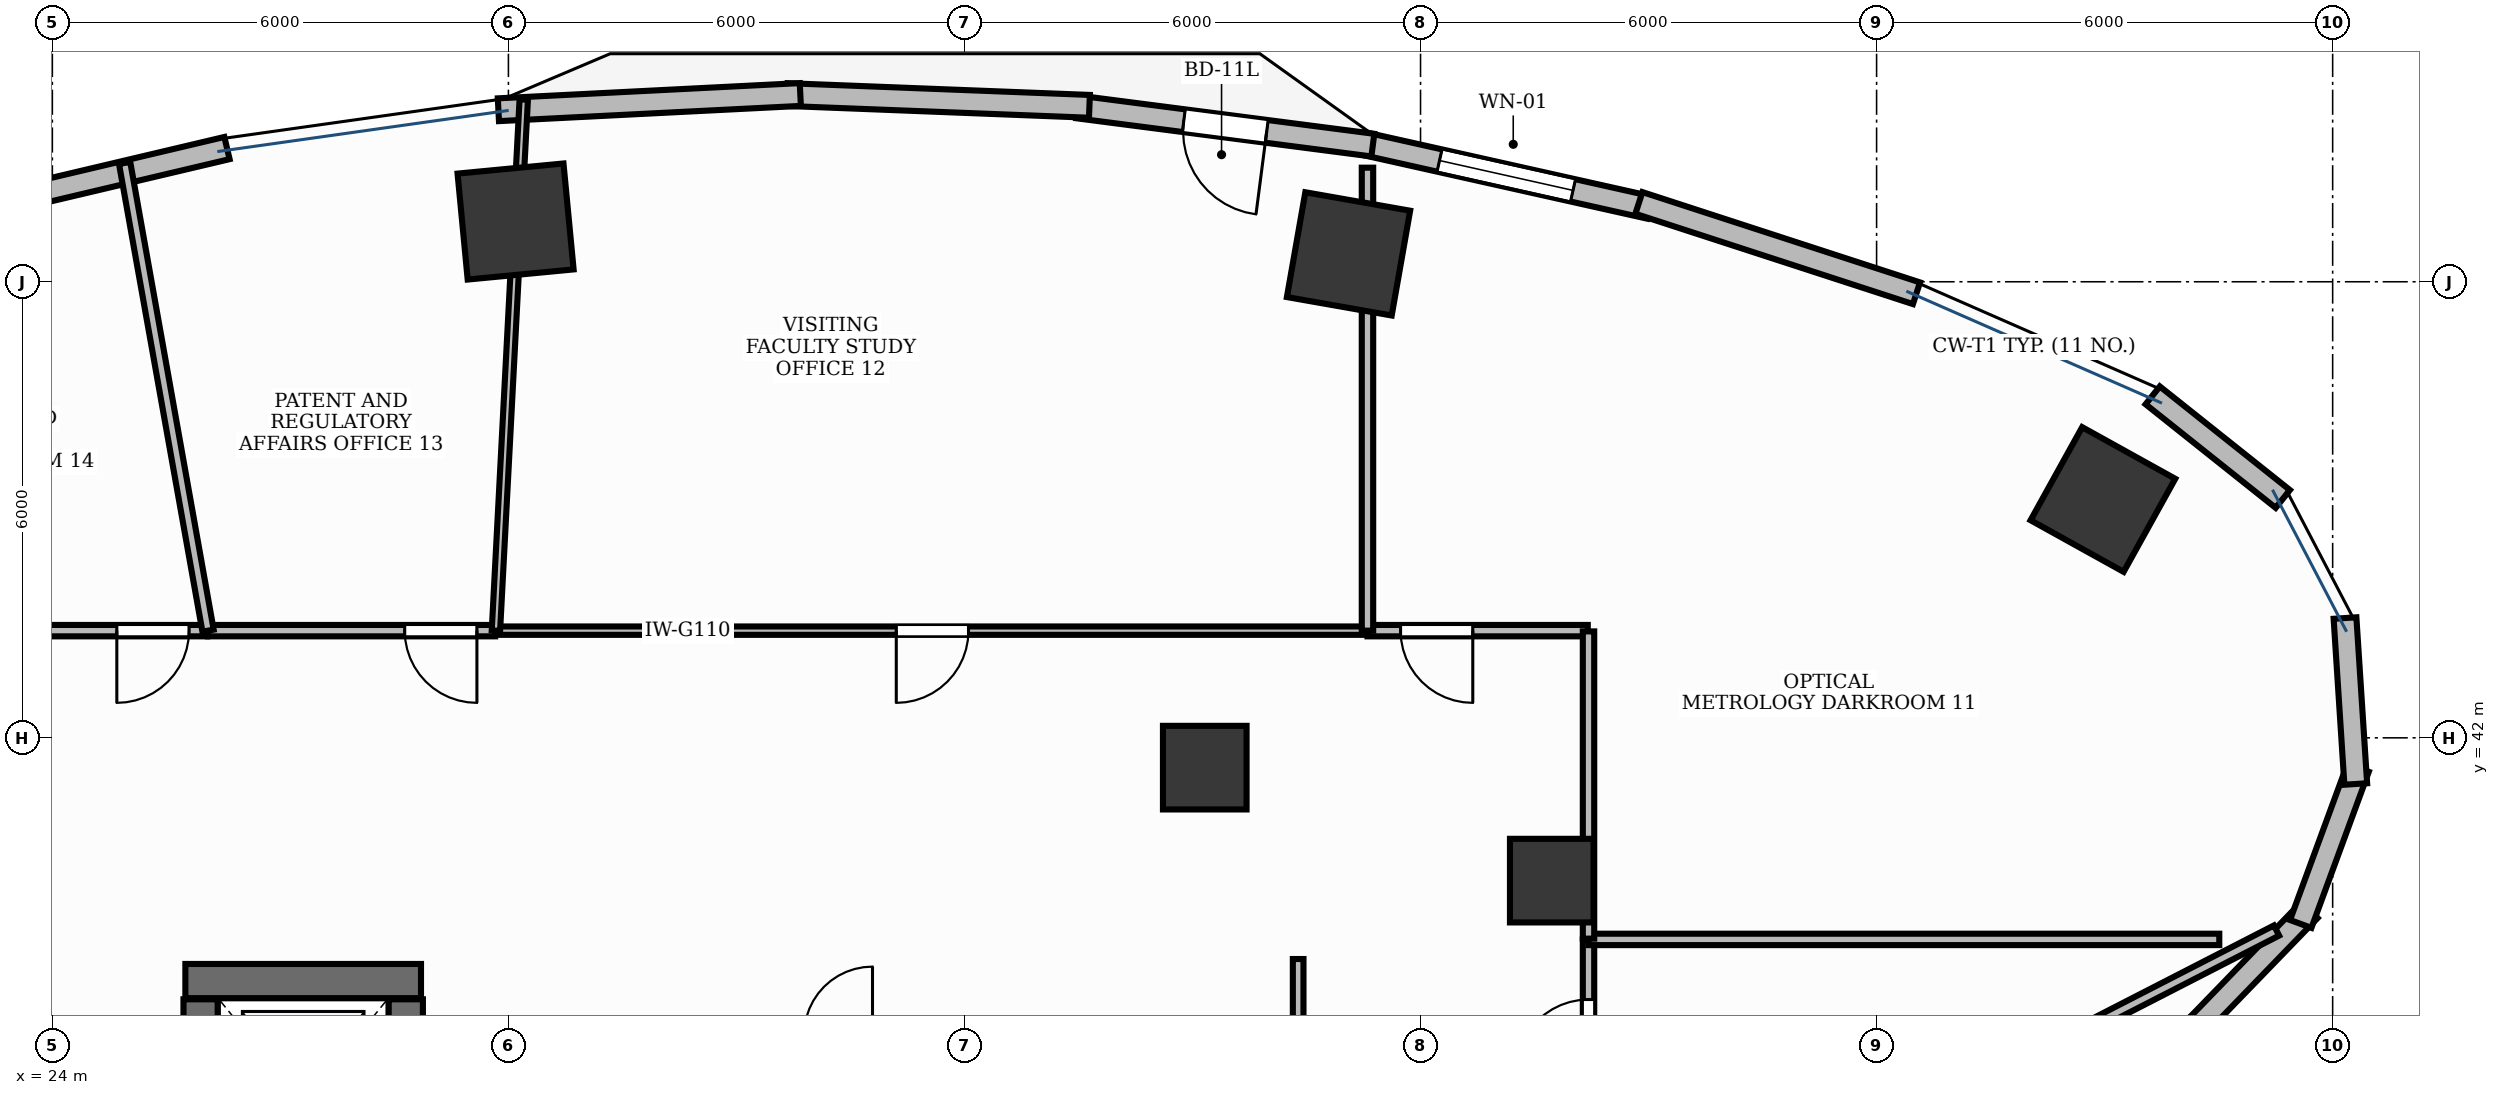
"""IFC4 building model, lengths in metres.
Left out: names, types, materials, properties, quantities, classifications, styles, units other than length and angle.
Written with IfcOpenShell. Run it as: python <this file> out.ifc"""

import sys

from ifc_helpers import new_model, si_unit, direction, frame, frame_2d, origin, origin_2d, place, context, subcontext, project, spatial, rectangle, extrude, element, fill, save


model = new_model("IFC4")
c1 = context("Model", 3, precision=1e-05, world=origin(), true_north=direction((0.0, 1.0)))
c2 = subcontext(c1, "Body", "Model", "MODEL_VIEW")
j1 = project(units=[si_unit("LENGTHUNIT", "METRE"), si_unit("PLANEANGLEUNIT", "RADIAN")], contexts=[c1])
p1 = place(None, origin())
s1 = spatial("IfcSite", under=j1, at=p1, CompositionType="ELEMENT")
p2 = place(p1, origin())
s2 = spatial("IfcBuilding", under=s1, at=p2, CompositionType="ELEMENT")
p3 = place(p2, frame((0.0, 0.0, 25.8)))
s3 = spatial("IfcBuildingStorey", under=s2, at=p3, CompositionType="ELEMENT", Elevation=25.8)
p4 = place(p3, frame((25.75, 38.8, 0.0), z_axis=(0.0, 0.0, 1.0), x_axis=(1.0, 0.0, 0.0)))
e1 = element("IfcWall", 1, at=p4, inside=s3, PredefinedType="SHEAR", context=c2, shape_type="SweptSolid", body=[
    extrude(rectangle(XDim=3.1, YDim=0.45, at=frame_2d((1.55, 0.0))), origin(), (0.0, 0.0, 1.0), 3.9),
])
for number, where, z_axis, x_axis in (
    (2, (25.95, 35.86, 0.0), (0.0, 0.0, 1.0), (0.0, 1.0, 0.0)),
    (3, (28.65, 35.86, 0.0), (0.0, 0.0, 1.0), (0.0, 1.0, 0.0)),
):
    element("IfcWall", number, at=place(p3, frame(where, z_axis=z_axis, x_axis=x_axis)), inside=s3, PredefinedType="SHEAR", context=c2, shape_type="SweptSolid", body=[
        extrude(rectangle(XDim=2.7, YDim=0.45, at=frame_2d((1.35, 0.0))), origin(), (0.0, 0.0, 1.0), 3.9),
    ])
p5 = place(p3, frame((50.977, 45.135, -0.0), z_axis=(0.0, 0.0, 1.0), x_axis=(-0.874535078577, 0.484962262797, 0.0)))
e4 = element("IfcColumn", 4, at=p5, inside=s3, PredefinedType="COLUMN", context=c2, shape_type="SweptSolid", body=[
    extrude(rectangle(XDim=1.4, YDim=1.4, at=origin_2d()), origin(), (0.0, 0.0, 1.0), 3.901),
])
p6 = place(p3, frame((43.727, 40.121, -0.0), z_axis=(0.0, 0.0, 1.0), x_axis=(1.0, 0.0, 0.0)))
e5 = element("IfcColumn", 5, at=p6, inside=s3, PredefinedType="COLUMN", context=c2, shape_type="SweptSolid", body=[
    extrude(rectangle(XDim=1.1, YDim=1.1, at=origin_2d()), origin(), (0.0, 0.0, 1.0), 3.901),
])
p7 = place(p3, frame((41.052, 48.367, -0.0), z_axis=(0.0, 0.0, 1.0), x_axis=(-0.984868307662, 0.173304404339, 0.0)))
e6 = element("IfcColumn", 6, at=p7, inside=s3, PredefinedType="COLUMN", context=c2, shape_type="SweptSolid", body=[
    extrude(rectangle(XDim=1.4, YDim=1.4, at=origin_2d()), origin(), (0.0, 0.0, 1.0), 3.901),
])
p8 = place(p3, frame((39.161, 41.608, -0.0), z_axis=(0.0, 0.0, 1.0), x_axis=(1.0, 0.0, 0.0)))
e7 = element("IfcColumn", 7, at=p8, inside=s3, PredefinedType="COLUMN", context=c2, shape_type="SweptSolid", body=[
    extrude(rectangle(XDim=1.1, YDim=1.1, at=origin_2d()), origin(), (0.0, 0.0, 1.0), 3.901),
])
p9 = place(p3, frame((30.094, 48.792, -0.0), z_axis=(0.0, 0.0, 1.0), x_axis=(0.995462868748, 0.095150811579, 0.0)))
e8 = element("IfcColumn", 8, at=p9, inside=s3, PredefinedType="COLUMN", context=c2, shape_type="SweptSolid", body=[
    extrude(rectangle(XDim=1.4, YDim=1.4, at=origin_2d()), origin(), (0.0, 0.0, 1.0), 3.901),
])
p10 = place(p3, frame((45.016, 48.976, 0.0), z_axis=(0.0, 0.0, 1.0), x_axis=(-0.9758772609, 0.218319883791, 0.0)))
e9 = element("IfcWall", 9, at=p10, inside=s3, PredefinedType="STANDARD", context=c2, shape_type="SweptSolid", body=[
    extrude(rectangle(XDim=3.869, YDim=0.3, at=frame_2d((1.935, 0.0))), origin(), (0.0, 0.0, 1.0), 3.9),
])
p11 = place(p10, frame((1.034, 0.0, 0.9)))
e10 = element("IfcOpeningElement", 10, at=p11, cuts=e9, PredefinedType="OPENING", context=c2, shape_type="SweptSolid", body=[
    extrude(rectangle(XDim=1.8, YDim=2.1, at=frame_2d((0.9, 1.05))), frame((0.0, 0.165, 0.0), z_axis=(0.0, -1.0, 0.0), x_axis=(1.0, 0.0, 0.0)), (0.0, 0.0, 1.0), 0.33),
])
p12 = place(p3, frame((41.373, 49.798, 0.0), z_axis=(0.0, 0.0, 1.0), x_axis=(-0.991741322416, 0.128254237408, 0.0)))
e11 = element("IfcWall", 11, at=p12, inside=s3, PredefinedType="STANDARD", context=c2, shape_type="SweptSolid", body=[
    extrude(rectangle(XDim=3.916, YDim=0.3, at=frame_2d((1.958, 0.0))), origin(), (0.0, 0.0, 1.0), 3.47),
])
p13 = place(p12, frame((1.408, 0.0, 0.0)))
e12 = element("IfcOpeningElement", 12, at=p13, cuts=e11, PredefinedType="OPENING", context=c2, shape_type="SweptSolid", body=[
    extrude(rectangle(XDim=1.1, YDim=2.15, at=frame_2d((0.55, 1.075))), frame((0.0, 0.165, 0.0), z_axis=(0.0, -1.0, 0.0), x_axis=(1.0, 0.0, 0.0)), (0.0, 0.0, 1.0), 0.33),
])
p14 = place(p3, frame((48.525, 47.849, 0.0), z_axis=(0.0, 0.0, 1.0), x_axis=(-0.950965833732, 0.309295947393, 0.0)))
e13 = element("IfcWall", 13, at=p14, inside=s3, PredefinedType="STANDARD", context=c2, shape_type="SweptSolid", body=[
    extrude(rectangle(XDim=3.84, YDim=0.3, at=frame_2d((1.92, 0.0))), origin(), (0.0, 0.0, 1.0), 3.9),
])
p15 = place(p3, frame((37.644, 50.308, 0.0), z_axis=(0.0, 0.0, 1.0), x_axis=(-0.999245411623, 0.038840794937, 0.0)))
e14 = element("IfcWall", 14, at=p15, inside=s3, PredefinedType="STANDARD", context=c2, shape_type="SweptSolid", body=[
    extrude(rectangle(XDim=3.979, YDim=0.3, at=frame_2d((1.989, 0.0))), origin(), (0.0, 0.0, 1.0), 3.9),
])
p16 = place(p3, frame((33.84, 50.463, 0.0), z_axis=(0.0, 0.0, 1.0), x_axis=(-0.998732359232, -0.050335619826, 0.0)))
e15 = element("IfcWall", 15, at=p16, inside=s3, PredefinedType="STANDARD", context=c2, shape_type="SweptSolid", body=[
    extrude(rectangle(XDim=3.977, YDim=0.3, at=frame_2d((1.989, 0.0))), origin(), (0.0, 0.0, 1.0), 3.47),
])
p17 = place(p3, frame((26.297, 49.759, 0.0), z_axis=(0.0, 0.0, 1.0), x_axis=(-0.973197600754, -0.229970497863, 0.0)))
e16 = element("IfcWall", 16, at=p17, inside=s3, PredefinedType="STANDARD", context=c2, shape_type="SweptSolid", body=[
    extrude(rectangle(XDim=3.901, YDim=0.3, at=frame_2d((1.951, 0.0))), origin(), (0.0, 0.0, 1.0), 3.9),
])
p18 = place(p3, frame((49.709, 36.029, 0.0), z_axis=(0.0, 0.0, 1.0), x_axis=(0.754746490246, 0.656016566454, 0.0)))
e17 = element("IfcWall", 17, at=p18, inside=s3, PredefinedType="STANDARD", context=c2, shape_type="SweptSolid", body=[
    extrude(rectangle(XDim=3.43, YDim=0.3, at=frame_2d((1.715, 0.0))), origin(), (0.0, 0.0, 1.0), 3.9),
])
p19 = place(p3, frame((52.173, 38.161, 0.0), z_axis=(0.0, 0.0, 1.0), x_axis=(0.695404695719, 0.718618333451, 0.0)))
e18 = element("IfcWall", 18, at=p19, inside=s3, PredefinedType="STANDARD", context=c2, shape_type="SweptSolid", body=[
    extrude(rectangle(XDim=2.188, YDim=0.3, at=frame_2d((1.094, 0.0))), origin(), (0.0, 0.0, 1.0), 3.9),
])
for number, where, z_axis, x_axis in (
    (19, (53.58, 39.552, 0.0), (0.0, 0.0, 1.0), (0.345, 0.939, 0.0)),
    (20, (54.304, 41.393, 0.0), (0.0, 0.0, 1.0), (-0.065, 0.998, 0.0)),
    (21, (53.344, 45.143, 0.0), (0.0, 0.0, 1.0), (-0.782, 0.623, 0.0)),
):
    element("IfcWall", number, at=place(p3, frame(where, z_axis=z_axis, x_axis=x_axis)), inside=s3, PredefinedType="STANDARD", context=c2, shape_type="SweptSolid", body=[
        extrude(rectangle(XDim=2.188, YDim=0.3, at=frame_2d((1.094, 0.0))), origin(), (0.0, 0.0, 1.0), 3.9),
    ])
p20 = place(p3, frame((44.21, 34.83, 0.0), z_axis=(0.0, 0.0, 1.0), x_axis=(0.0, 1.0, 0.0)))
e22 = element("IfcWall", 22, at=p20, inside=s3, PredefinedType="PARTITIONING", context=c2, shape_type="SweptSolid", body=[
    extrude(rectangle(XDim=4.518, YDim=0.15, at=frame_2d((2.259, 0.0))), origin(), (0.0, 0.0, 1.0), 2.91),
])
p21 = place(p20, frame((2.777, 0.0, 0.0)))
e23 = element("IfcOpeningElement", 23, at=p21, cuts=e22, PredefinedType="OPENING", context=c2, shape_type="SweptSolid", body=[
    extrude(rectangle(XDim=0.95, YDim=2.15, at=frame_2d((0.475, 1.075))), frame((0.0, 0.09, 0.0), z_axis=(0.0, -1.0, 0.0), x_axis=(1.0, 0.0, 0.0)), (0.0, 0.0, 1.0), 0.18),
])
p22 = place(p3, frame((40.39, 39.09, 0.0), z_axis=(0.0, 0.0, 1.0), x_axis=(0.0, -1.0, 0.0)))
e24 = element("IfcWall", 24, at=p22, inside=s3, PredefinedType="PARTITIONING", context=c2, shape_type="SweptSolid", body=[
    extrude(rectangle(XDim=10.48, YDim=0.14, at=frame_2d((5.24, 0.0))), origin(), (0.0, 0.0, 1.0), 2.91),
])
p23 = place(p22, frame((6.447, 0.0, 0.0)))
e25 = element("IfcOpeningElement", 25, at=p23, cuts=e24, PredefinedType="OPENING", context=c2, shape_type="SweptSolid", body=[
    extrude(rectangle(XDim=0.95, YDim=2.15, at=frame_2d((0.475, 1.075))), frame((0.0, 0.085, 0.0), z_axis=(0.0, -1.0, 0.0), x_axis=(1.0, 0.0, 0.0)), (0.0, 0.0, 1.0), 0.17),
])
p24 = place(p3, frame((44.2, 43.41, 0.0), z_axis=(0.0, 0.0, 1.0), x_axis=(-1.0, 0.0, 0.0)))
e26 = element("IfcWall", 26, at=p24, inside=s3, PredefinedType="PARTITIONING", context=c2, shape_type="SweptSolid", body=[
    extrude(rectangle(XDim=2.898, YDim=0.15, at=frame_2d((1.449, 0.0))), origin(), (0.0, 0.0, 1.0), 2.91),
])
p25 = place(p24, frame((1.513, 0.0, 0.0)))
e27 = element("IfcOpeningElement", 27, at=p25, cuts=e26, PredefinedType="OPENING", context=c2, shape_type="SweptSolid", body=[
    extrude(rectangle(XDim=0.95, YDim=2.15, at=frame_2d((0.475, 1.075))), frame((0.0, 0.09, 0.0), z_axis=(0.0, -1.0, 0.0), x_axis=(1.0, 0.0, 0.0)), (0.0, 0.0, 1.0), 0.18),
])
p26 = place(p3, frame((41.292, 43.41, 0.0), z_axis=(0.0, 0.0, 1.0), x_axis=(-1.0, 0.0, 0.0)))
e28 = element("IfcWall", 28, at=p26, inside=s3, PredefinedType="MOVABLE", context=c2, shape_type="SweptSolid", body=[
    extrude(rectangle(XDim=11.456, YDim=0.11, at=frame_2d((5.728, 0.0))), origin(), (0.0, 0.0, 1.0), 2.91),
])
p27 = place(p26, frame((5.239, 0.0, 0.0)))
e29 = element("IfcOpeningElement", 29, at=p27, cuts=e28, PredefinedType="OPENING", context=c2, shape_type="SweptSolid", body=[
    extrude(rectangle(XDim=0.95, YDim=2.15, at=frame_2d((0.475, 1.075))), frame((0.0, 0.07, 0.0), z_axis=(0.0, -1.0, 0.0), x_axis=(1.0, 0.0, 0.0)), (0.0, 0.0, 1.0), 0.14),
])
p28 = place(p3, frame((29.826, 43.41, 0.0), z_axis=(0.0, 0.0, 1.0), x_axis=(-1.0, 0.0, 0.0)))
e30 = element("IfcWall", 30, at=p28, inside=s3, PredefinedType="PARTITIONING", context=c2, shape_type="SweptSolid", body=[
    extrude(rectangle(XDim=3.777, YDim=0.15, at=frame_2d((1.889, 0.0))), origin(), (0.0, 0.0, 1.0), 2.91),
])
p29 = place(p28, frame((0.24, 0.0, 0.0)))
e31 = element("IfcOpeningElement", 31, at=p29, cuts=e30, PredefinedType="OPENING", context=c2, shape_type="SweptSolid", body=[
    extrude(rectangle(XDim=0.95, YDim=2.15, at=frame_2d((0.475, 1.075))), frame((0.0, 0.09, 0.0), z_axis=(0.0, -1.0, 0.0), x_axis=(1.0, 0.0, 0.0)), (0.0, 0.0, 1.0), 0.18),
])
p30 = place(p3, frame((26.038, 43.41, 0.0), z_axis=(0.0, 0.0, 1.0), x_axis=(-1.0, 0.0, 0.0)))
e32 = element("IfcWall", 32, at=p30, inside=s3, PredefinedType="PARTITIONING", context=c2, shape_type="SweptSolid", body=[
    extrude(rectangle(XDim=10.447, YDim=0.15, at=frame_2d((5.224, 0.0))), origin(), (0.0, 0.0, 1.0), 2.91),
])
p31 = place(p30, frame((0.24, 0.0, 0.0)))
e33 = element("IfcOpeningElement", 33, at=p31, cuts=e32, PredefinedType="OPENING", context=c2, shape_type="SweptSolid", body=[
    extrude(rectangle(XDim=0.95, YDim=2.15, at=frame_2d((0.475, 1.075))), frame((0.0, 0.09, 0.0), z_axis=(0.0, -1.0, 0.0), x_axis=(1.0, 0.0, 0.0)), (0.0, 0.0, 1.0), 0.18),
])
p32 = place(p3, frame((44.21, 34.819, 0.0), z_axis=(0.0, 0.0, 1.0), x_axis=(0.889650018361, 0.456643016842, 0.0)))
e34 = element("IfcWall", 34, at=p32, inside=s3, PredefinedType="PARTITIONING", context=c2, shape_type="SweptSolid", body=[
    extrude(rectangle(XDim=10.174, YDim=0.15, at=frame_2d((5.087, 0.0))), origin(), (0.0, 0.0, 1.0), 2.91),
])
p33 = place(p3, frame((44.21, 39.348, 0.0), z_axis=(0.0, 0.0, 1.0), x_axis=(1.0, 0.0, 0.0)))
e35 = element("IfcWall", 35, at=p33, inside=s3, PredefinedType="PARTITIONING", context=c2, shape_type="SweptSolid", body=[
    extrude(rectangle(XDim=8.299, YDim=0.15, at=frame_2d((4.149, 0.0))), origin(), (0.0, 0.0, 1.0), 2.91),
])
p34 = place(p3, frame((44.21, 39.358, 0.0), z_axis=(0.0, 0.0, 1.0), x_axis=(0.0, 1.0, 0.0)))
e36 = element("IfcWall", 36, at=p34, inside=s3, PredefinedType="PARTITIONING", context=c2, shape_type="SweptSolid", body=[
    extrude(rectangle(XDim=4.042, YDim=0.15, at=frame_2d((2.021, 0.0))), origin(), (0.0, 0.0, 1.0), 2.91),
])
p35 = place(p3, frame((41.302, 43.41, 0.0), z_axis=(0.0, 0.0, 1.0), x_axis=(0.0, 1.0, 0.0)))
e37 = element("IfcWall", 37, at=p35, inside=s3, PredefinedType="PARTITIONING", context=c2, shape_type="SweptSolid", body=[
    extrude(rectangle(XDim=6.091, YDim=0.15, at=frame_2d((3.045, 0.0))), origin(), (0.0, 0.0, 1.0), 2.91),
])
p36 = place(p3, frame((29.836, 43.41, 0.0), z_axis=(0.0, 0.0, 1.0), x_axis=(0.052328125399, 0.998629945121, 0.0)))
e38 = element("IfcWall", 38, at=p36, inside=s3, PredefinedType="MOVABLE", context=c2, shape_type="SweptSolid", body=[
    extrude(rectangle(XDim=6.998, YDim=0.11, at=frame_2d((3.499, 0.0))), origin(), (0.0, 0.0, 1.0), 2.91),
])
p37 = place(p3, frame((26.048, 43.41, 0.0), z_axis=(0.0, 0.0, 1.0), x_axis=(-0.175605435055, 0.984460629573, 0.0)))
e39 = element("IfcWall", 39, at=p37, inside=s3, PredefinedType="PARTITIONING", context=c2, shape_type="SweptSolid", body=[
    extrude(rectangle(XDim=6.251, YDim=0.15, at=frame_2d((3.125, 0.0))), origin(), (0.0, 0.0, 1.0), 2.91),
])
p38 = place(p11, origin())
e40 = element("IfcWindow", 40, at=p38, inside=s3, PartitioningType="SINGLE_PANEL", PredefinedType="WINDOW", context=c2, shape_type="SweptSolid", body=[
    extrude(rectangle(XDim=1.8, YDim=2.1, at=frame_2d((0.9, 1.05))), frame((0.0, 0.03, 0.0), z_axis=(0.0, -1.0, 0.0), x_axis=(1.0, 0.0, 0.0)), (0.0, 0.0, 1.0), 0.06),
])
fill(e10, e40)
p39 = place(p13, origin())
e41 = element("IfcDoor", 41, at=p39, inside=s3, OperationType="SINGLE_SWING_LEFT", PredefinedType="DOOR", context=c2, shape_type="SweptSolid", body=[
    extrude(rectangle(XDim=1.1, YDim=2.15, at=frame_2d((0.55, 1.075))), frame((0.0, 0.025, 0.0), z_axis=(0.0, -1.0, 0.0), x_axis=(1.0, 0.0, 0.0)), (0.0, 0.0, 1.0), 0.05),
])
fill(e12, e41)
p40 = place(p21, origin())
e42 = element("IfcDoor", 42, at=p40, inside=s3, OperationType="SINGLE_SWING_LEFT", PredefinedType="DOOR", context=c2, shape_type="SweptSolid", body=[
    extrude(rectangle(XDim=0.95, YDim=2.15, at=frame_2d((0.475, 1.075))), frame((0.0, 0.025, 0.0), z_axis=(0.0, -1.0, 0.0), x_axis=(1.0, 0.0, 0.0)), (0.0, 0.0, 1.0), 0.05),
])
fill(e23, e42)
p41 = place(p25, origin())
e43 = element("IfcDoor", 43, at=p41, inside=s3, OperationType="SINGLE_SWING_LEFT", PredefinedType="DOOR", context=c2, shape_type="SweptSolid", body=[
    extrude(rectangle(XDim=0.95, YDim=2.15, at=frame_2d((0.475, 1.075))), frame((0.0, 0.025, 0.0), z_axis=(0.0, -1.0, 0.0), x_axis=(1.0, 0.0, 0.0)), (0.0, 0.0, 1.0), 0.05),
])
fill(e27, e43)
p42 = place(p27, origin())
e44 = element("IfcDoor", 44, at=p42, inside=s3, OperationType="SINGLE_SWING_RIGHT", PredefinedType="DOOR", context=c2, shape_type="SweptSolid", body=[
    extrude(rectangle(XDim=0.95, YDim=2.15, at=frame_2d((0.475, 1.075))), frame((0.0, 0.025, 0.0), z_axis=(0.0, -1.0, 0.0), x_axis=(1.0, 0.0, 0.0)), (0.0, 0.0, 1.0), 0.05),
])
fill(e29, e44)
p43 = place(p29, origin())
e45 = element("IfcDoor", 45, at=p43, inside=s3, OperationType="SINGLE_SWING_LEFT", PredefinedType="DOOR", context=c2, shape_type="SweptSolid", body=[
    extrude(rectangle(XDim=0.95, YDim=2.15, at=frame_2d((0.475, 1.075))), frame((0.0, 0.025, 0.0), z_axis=(0.0, -1.0, 0.0), x_axis=(1.0, 0.0, 0.0)), (0.0, 0.0, 1.0), 0.05),
])
fill(e31, e45)
p44 = place(p31, origin())
e46 = element("IfcDoor", 46, at=p44, inside=s3, OperationType="SINGLE_SWING_RIGHT", PredefinedType="DOOR", context=c2, shape_type="SweptSolid", body=[
    extrude(rectangle(XDim=0.95, YDim=2.15, at=frame_2d((0.475, 1.075))), frame((0.0, 0.025, 0.0), z_axis=(0.0, -1.0, 0.0), x_axis=(1.0, 0.0, 0.0)), (0.0, 0.0, 1.0), 0.05),
])
fill(e33, e46)
save(model, sys.argv[1])
